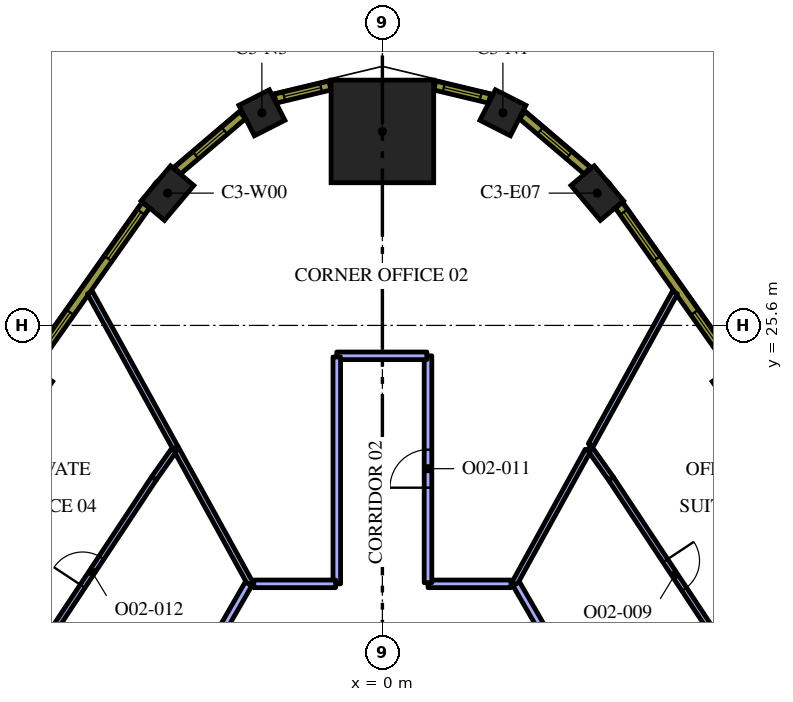
"""IFC4 building model, lengths in metres.
Left out: names, types, materials, properties, quantities, classifications, styles, units other than length and angle.
Written with IfcOpenShell. Run it as: python <this file> out.ifc"""

import sys

from ifc_helpers import new_model, si_unit, direction, frame, frame_2d, origin, origin_2d, place, context, subcontext, project, spatial, rectangle, extrude, element, fill, save


model = new_model("IFC4")
c1 = context("Model", 3, precision=1e-05, world=origin(), true_north=direction((0.0, 1.0)))
c2 = subcontext(c1, "Body", "Model", "MODEL_VIEW")
j1 = project(units=[si_unit("LENGTHUNIT", "METRE"), si_unit("PLANEANGLEUNIT", "RADIAN")], contexts=[c1])
p1 = place(None, origin())
s1 = spatial("IfcSite", under=j1, at=p1, CompositionType="ELEMENT")
p2 = place(p1, origin())
s2 = spatial("IfcBuilding", under=s1, at=p2, CompositionType="ELEMENT")
p3 = place(p2, frame((0.0, 0.0, 162.6)))
s3 = spatial("IfcBuildingStorey", under=s2, at=p3, CompositionType="ELEMENT", Elevation=162.6)
p4 = place(p3, frame((0.0, 30.704, 0.0), z_axis=(0.0, 0.0, 1.0), x_axis=(0.0, 1.0, 0.0)))
e1 = element("IfcColumn", 1, at=p4, inside=s3, PredefinedType="COLUMN", context=c2, shape_type="SweptSolid", body=[
    extrude(rectangle(XDim=2.7, YDim=2.7, at=origin_2d()), origin(), (0.0, 0.0, 1.0), 4.2),
])
for number, where, z_axis, x_axis in (
    (2, (9.348, 23.854, 0.0), (0.0, 0.0, 1.0), (-0.565, 0.825, 0.0)),
    (3, (5.654, 29.081, 0.0), (0.0, 0.0, 1.0), (-0.644, 0.765, 0.0)),
):
    element("IfcColumn", number, at=place(p3, frame(where, z_axis=z_axis, x_axis=x_axis)), inside=s3, PredefinedType="COLUMN", context=c2, shape_type="SweptSolid", body=[
        extrude(rectangle(XDim=1.2, YDim=0.8, at=origin_2d()), origin(), (0.0, 0.0, 1.0), 4.2),
    ])
for number, where, z_axis, x_axis in (
    (4, (3.171, 31.195, 0.0), (0.0, 0.0, 1.0), (-0.891, 0.453, 0.0)),
    (5, (-3.171, 31.195, 0.0), (0.0, 0.0, 1.0), (-0.891, -0.453, 0.0)),
):
    element("IfcColumn", number, at=place(p3, frame(where, z_axis=z_axis, x_axis=x_axis)), inside=s3, PredefinedType="COLUMN", context=c2, shape_type="SweptSolid", body=[
        extrude(rectangle(XDim=0.9, YDim=0.9, at=origin_2d()), origin(), (0.0, 0.0, 1.0), 4.2),
    ])
for number, where, z_axis, x_axis in (
    (6, (-5.654, 29.081, 0.0), (0.0, 0.0, 1.0), (-0.644, -0.765, 0.0)),
    (7, (-9.348, 23.854, 0.0), (0.0, 0.0, 1.0), (-0.565, -0.825, 0.0)),
):
    element("IfcColumn", number, at=place(p3, frame(where, z_axis=z_axis, x_axis=x_axis)), inside=s3, PredefinedType="COLUMN", context=c2, shape_type="SweptSolid", body=[
        extrude(rectangle(XDim=1.2, YDim=0.8, at=origin_2d()), origin(), (0.0, 0.0, 1.0), 4.2),
    ])
p5 = place(p3, frame((6.013, 21.573, 0.0), z_axis=(0.0, 0.0, 1.0), x_axis=(0.551906048292, -0.833906298009, 0.0)))
e8 = element("IfcWall", 8, at=p5, inside=s3, PredefinedType="PARTITIONING", context=c2, shape_type="SweptSolid", body=[
    extrude(rectangle(XDim=5.995, YDim=0.15, at=frame_2d((2.998, 0.0))), origin(), (0.0, 0.0, 1.0), 3.15),
])
p6 = place(p5, frame((2.595, 0.0, 0.0)))
e9 = element("IfcOpeningElement", 9, at=p6, cuts=e8, PredefinedType="OPENING", context=c2, shape_type="SweptSolid", body=[
    extrude(rectangle(XDim=0.9, YDim=2.1, at=frame_2d((0.45, 1.05))), frame((0.0, 0.085, 0.0), z_axis=(0.0, -1.0, 0.0), x_axis=(1.0, 0.0, 0.0)), (0.0, 0.0, 1.0), 0.17),
])
p7 = place(p3, frame((6.013, 21.573, 0.0), z_axis=(0.0, 0.0, 1.0), x_axis=(-0.576965221715, 0.816768714467, 0.0)))
e10 = element("IfcWall", 10, at=p7, inside=s3, PredefinedType="PARTITIONING", context=c2, shape_type="SweptSolid", body=[
    extrude(rectangle(XDim=0.986, YDim=0.15, at=frame_2d((0.493, 0.0))), origin(), (0.0, 0.0, 1.0), 3.15),
])
p8 = place(p3, frame((5.484, 22.451, 0.0), z_axis=(0.0, 0.0, 1.0), x_axis=(0.483018213307, 0.875610304652, 0.0)))
e11 = element("IfcWall", 11, at=p8, inside=s3, PredefinedType="PARTITIONING", context=c2, shape_type="SweptSolid", body=[
    extrude(rectangle(XDim=4.584, YDim=0.15, at=frame_2d((2.292, 0.0))), origin(), (0.0, 0.0, 1.0), 3.15),
])
p9 = place(p3, frame((3.47, 18.8, 0.0), z_axis=(0.0, 0.0, 1.0), x_axis=(0.483004783308, 0.87561771299, 0.0)))
e12 = element("IfcWall", 12, at=p9, inside=s3, PredefinedType="PARTITIONING", context=c2, shape_type="SweptSolid", body=[
    extrude(rectangle(XDim=4.003, YDim=0.15, at=frame_2d((2.001, 0.0))), origin(), (0.0, 0.0, 1.0), 3.15),
])
p10 = place(p3, frame((8.515, 10.152, 0.0), z_axis=(0.0, 0.0, 1.0), x_axis=(-0.499998974385, 0.866025995923, 0.0)))
e13 = element("IfcWall", 13, at=p10, inside=s3, PredefinedType="PARTITIONING", context=c2, shape_type="SweptSolid", body=[
    extrude(rectangle(XDim=9.986, YDim=0.2, at=frame_2d((4.993, 0.0))), origin(), (0.0, 0.0, 1.0), 3.15),
])
p11 = place(p10, frame((4.5, 0.0, 0.0)))
e14 = element("IfcOpeningElement", 14, at=p11, cuts=e13, PredefinedType="OPENING", context=c2, shape_type="SweptSolid", body=[
    extrude(rectangle(XDim=1.0, YDim=2.1, at=frame_2d((0.5, 1.05))), frame((0.0, 0.11, 0.0), z_axis=(0.0, -1.0, 0.0), x_axis=(1.0, 0.0, 0.0)), (0.0, 0.0, 1.0), 0.22),
])
p12 = place(p3, frame((-5.442, 22.374, 0.0), z_axis=(0.0, 0.0, 1.0), x_axis=(-0.482987550425, 0.875627218703, 0.0)))
e15 = element("IfcWall", 15, at=p12, inside=s3, PredefinedType="PARTITIONING", context=c2, shape_type="SweptSolid", body=[
    extrude(rectangle(XDim=4.672, YDim=0.15, at=frame_2d((2.336, 0.0))), origin(), (0.0, 0.0, 1.0), 3.15),
])
p13 = place(p3, frame((-3.47, 18.8, 0.0), z_axis=(0.0, 0.0, 1.0), x_axis=(-0.482974768035, 0.875634269225, 0.0)))
e16 = element("IfcWall", 16, at=p13, inside=s3, PredefinedType="PARTITIONING", context=c2, shape_type="SweptSolid", body=[
    extrude(rectangle(XDim=4.09, YDim=0.15, at=frame_2d((2.045, 0.0))), origin(), (0.0, 0.0, 1.0), 3.15),
])
p14 = place(p3, frame((3.385, 18.8, 0.0), z_axis=(0.0, 0.0, 1.0), x_axis=(-1.0, 0.0, 0.0)))
e17 = element("IfcWall", 17, at=p14, inside=s3, PredefinedType="PARTITIONING", context=c2, shape_type="SweptSolid", body=[
    extrude(rectangle(XDim=2.185, YDim=0.2, at=frame_2d((1.092, 0.0))), origin(), (0.0, 0.0, 1.0), 3.15),
])
p15 = place(p3, frame((1.2, 18.83, 0.0), z_axis=(0.0, 0.0, 1.0), x_axis=(0.0, 1.0, 0.0)))
e18 = element("IfcWall", 18, at=p15, inside=s3, PredefinedType="PARTITIONING", context=c2, shape_type="SweptSolid", body=[
    extrude(rectangle(XDim=5.97, YDim=0.2, at=frame_2d((2.985, 0.0))), origin(), (0.0, 0.0, 1.0), 3.15),
])
p16 = place(p15, frame((2.5, 0.0, 0.0)))
e19 = element("IfcOpeningElement", 19, at=p16, cuts=e18, PredefinedType="OPENING", context=c2, shape_type="SweptSolid", body=[
    extrude(rectangle(XDim=1.0, YDim=2.1, at=frame_2d((0.5, 1.05))), frame((0.0, 0.11, 0.0), z_axis=(0.0, -1.0, 0.0), x_axis=(1.0, 0.0, 0.0)), (0.0, 0.0, 1.0), 0.22),
])
p17 = place(p3, frame((1.17, 24.8, 0.0), z_axis=(0.0, 0.0, 1.0), x_axis=(-1.0, 0.0, 0.0)))
e20 = element("IfcWall", 20, at=p17, inside=s3, PredefinedType="PARTITIONING", context=c2, shape_type="SweptSolid", body=[
    extrude(rectangle(XDim=2.37, YDim=0.2, at=frame_2d((1.185, 0.0))), origin(), (0.0, 0.0, 1.0), 3.15),
])
p18 = place(p3, frame((-1.2, 24.77, 0.0), z_axis=(0.0, 0.0, 1.0), x_axis=(0.0, -1.0, 0.0)))
e21 = element("IfcWall", 21, at=p18, inside=s3, PredefinedType="PARTITIONING", context=c2, shape_type="SweptSolid", body=[
    extrude(rectangle(XDim=5.97, YDim=0.2, at=frame_2d((2.985, 0.0))), origin(), (0.0, 0.0, 1.0), 3.15),
])
p19 = place(p3, frame((-1.23, 18.8, 0.0), z_axis=(0.0, 0.0, 1.0), x_axis=(-1.0, 0.0, 0.0)))
e22 = element("IfcWall", 22, at=p19, inside=s3, PredefinedType="PARTITIONING", context=c2, shape_type="SweptSolid", body=[
    extrude(rectangle(XDim=2.155, YDim=0.2, at=frame_2d((1.077, 0.0))), origin(), (0.0, 0.0, 1.0), 3.15),
])
p20 = place(p3, frame((-5.492, 22.31, 0.0), z_axis=(0.0, 0.0, 1.0), x_axis=(-0.576980663571, -0.816757806124, 0.0)))
e23 = element("IfcWall", 23, at=p20, inside=s3, PredefinedType="PARTITIONING", context=c2, shape_type="SweptSolid", body=[
    extrude(rectangle(XDim=0.902, YDim=0.15, at=frame_2d((0.451, 0.0))), origin(), (0.0, 0.0, 1.0), 3.15),
])
p21 = place(p3, frame((-9.322, 16.573, 0.0), z_axis=(0.0, 0.0, 1.0), x_axis=(0.551906048292, 0.833906298009, 0.0)))
e24 = element("IfcWall", 24, at=p21, inside=s3, PredefinedType="PARTITIONING", context=c2, shape_type="SweptSolid", body=[
    extrude(rectangle(XDim=5.995, YDim=0.15, at=frame_2d((2.998, 0.0))), origin(), (0.0, 0.0, 1.0), 3.15),
])
p22 = place(p21, frame((2.595, 0.0, 0.0)))
e25 = element("IfcOpeningElement", 25, at=p22, cuts=e24, PredefinedType="OPENING", context=c2, shape_type="SweptSolid", body=[
    extrude(rectangle(XDim=0.9, YDim=2.1, at=frame_2d((0.45, 1.05))), frame((0.0, 0.085, 0.0), z_axis=(0.0, -1.0, 0.0), x_axis=(1.0, 0.0, 0.0)), (0.0, 0.0, 1.0), 0.17),
])
p23 = place(p3, frame((-3.522, 18.8, 0.0), z_axis=(0.0, 0.0, 1.0), x_axis=(-0.500015783377, -0.866016291056, 0.0)))
e26 = element("IfcWall", 26, at=p23, inside=s3, PredefinedType="PARTITIONING", context=c2, shape_type="SweptSolid", body=[
    extrude(rectangle(XDim=9.99, YDim=0.2, at=frame_2d((4.995, 0.0))), origin(), (0.0, 0.0, 1.0), 3.15),
])
p24 = place(p23, frame((4.5, 0.0, 0.0)))
e27 = element("IfcOpeningElement", 27, at=p24, cuts=e26, PredefinedType="OPENING", context=c2, shape_type="SweptSolid", body=[
    extrude(rectangle(XDim=1.0, YDim=2.1, at=frame_2d((0.5, 1.05))), frame((0.0, 0.11, 0.0), z_axis=(0.0, -1.0, 0.0), x_axis=(1.0, 0.0, 0.0)), (0.0, 0.0, 1.0), 0.22),
])
p25 = place(p3, frame((9.231, 24.504, 0.0), z_axis=(0.0, 0.0, 1.0), x_axis=(-0.577115207679, 0.816662743772, 0.0)))
e28 = element("IfcWall", 28, at=p25, inside=s3, PredefinedType="SOLIDWALL", context=c2, shape_type="SweptSolid", body=[
    extrude(rectangle(XDim=5.213, YDim=0.24, at=frame_2d((2.606, 0.0))), origin(), (0.0, 0.0, 1.0), 3.95),
])
p26 = place(p25, frame((0.261, 0.0, 0.9)))
e29 = element("IfcOpeningElement", 29, at=p26, cuts=e28, PredefinedType="OPENING", context=c2, shape_type="SweptSolid", body=[
    extrude(rectangle(XDim=1.5, YDim=2.55, at=frame_2d((0.75, 1.275))), frame((0.0, 0.13, 0.0), z_axis=(0.0, -1.0, 0.0), x_axis=(1.0, 0.0, 0.0)), (0.0, 0.0, 1.0), 0.26),
])
p27 = place(p25, frame((3.492, 0.0, 0.9)))
e30 = element("IfcOpeningElement", 30, at=p27, cuts=e28, PredefinedType="OPENING", context=c2, shape_type="SweptSolid", body=[
    extrude(rectangle(XDim=1.5, YDim=2.55, at=frame_2d((0.75, 1.275))), frame((0.0, 0.13, 0.0), z_axis=(0.0, -1.0, 0.0), x_axis=(1.0, 0.0, 0.0)), (0.0, 0.0, 1.0), 0.26),
])
p28 = place(p3, frame((5.392, 29.672, 0.0), z_axis=(0.0, 0.0, 1.0), x_axis=(-0.761419744247, 0.648259186645, 0.0)))
e31 = element("IfcWall", 31, at=p28, inside=s3, PredefinedType="SOLIDWALL", context=c2, shape_type="SweptSolid", body=[
    extrude(rectangle(XDim=2.25, YDim=0.24, at=frame_2d((1.125, 0.0))), origin(), (0.0, 0.0, 1.0), 3.95),
])
p29 = place(p28, frame((0.625, 0.0, 0.9)))
e32 = element("IfcOpeningElement", 32, at=p29, cuts=e31, PredefinedType="OPENING", context=c2, shape_type="SweptSolid", body=[
    extrude(rectangle(XDim=1.0, YDim=2.55, at=frame_2d((0.5, 1.275))), frame((0.0, 0.13, 0.0), z_axis=(0.0, -1.0, 0.0), x_axis=(1.0, 0.0, 0.0)), (0.0, 0.0, 1.0), 0.26),
])
p30 = place(p3, frame((2.821, 31.566, 0.0), z_axis=(0.0, 0.0, 1.0), x_axis=(-0.972479955788, 0.232986556673, 0.0)))
e33 = element("IfcWall", 33, at=p30, inside=s3, PredefinedType="SOLIDWALL", context=c2, shape_type="SweptSolid", body=[
    extrude(rectangle(XDim=1.482, YDim=0.24, at=frame_2d((0.741, 0.0))), origin(), (0.0, 0.0, 1.0), 3.95),
])
p31 = place(p30, frame((0.241, 0.0, 0.9)))
e34 = element("IfcOpeningElement", 34, at=p31, cuts=e33, PredefinedType="OPENING", context=c2, shape_type="SweptSolid", body=[
    extrude(rectangle(XDim=1.0, YDim=2.55, at=frame_2d((0.5, 1.275))), frame((0.0, 0.13, 0.0), z_axis=(0.0, -1.0, 0.0), x_axis=(1.0, 0.0, 0.0)), (0.0, 0.0, 1.0), 0.26),
])
p32 = place(p3, frame((-1.38, 31.912, 0.0), z_axis=(0.0, 0.0, 1.0), x_axis=(-0.972479955788, -0.232986556673, 0.0)))
e35 = element("IfcWall", 35, at=p32, inside=s3, PredefinedType="SOLIDWALL", context=c2, shape_type="SweptSolid", body=[
    extrude(rectangle(XDim=1.482, YDim=0.24, at=frame_2d((0.741, 0.0))), origin(), (0.0, 0.0, 1.0), 3.95),
])
p33 = place(p32, frame((0.241, 0.0, 0.9)))
e36 = element("IfcOpeningElement", 36, at=p33, cuts=e35, PredefinedType="OPENING", context=c2, shape_type="SweptSolid", body=[
    extrude(rectangle(XDim=1.0, YDim=2.55, at=frame_2d((0.5, 1.275))), frame((0.0, 0.13, 0.0), z_axis=(0.0, -1.0, 0.0), x_axis=(1.0, 0.0, 0.0)), (0.0, 0.0, 1.0), 0.26),
])
p34 = place(p3, frame((-3.678, 31.131, 0.0), z_axis=(0.0, 0.0, 1.0), x_axis=(-0.761419744247, -0.648259186645, 0.0)))
e37 = element("IfcWall", 37, at=p34, inside=s3, PredefinedType="SOLIDWALL", context=c2, shape_type="SweptSolid", body=[
    extrude(rectangle(XDim=2.25, YDim=0.24, at=frame_2d((1.125, 0.0))), origin(), (0.0, 0.0, 1.0), 3.95),
])
p35 = place(p34, frame((0.625, 0.0, 0.9)))
e38 = element("IfcOpeningElement", 38, at=p35, cuts=e37, PredefinedType="OPENING", context=c2, shape_type="SweptSolid", body=[
    extrude(rectangle(XDim=1.0, YDim=2.55, at=frame_2d((0.5, 1.275))), frame((0.0, 0.13, 0.0), z_axis=(0.0, -1.0, 0.0), x_axis=(1.0, 0.0, 0.0)), (0.0, 0.0, 1.0), 0.26),
])
p36 = place(p3, frame((-6.223, 28.762, 0.0), z_axis=(0.0, 0.0, 1.0), x_axis=(-0.577115207679, -0.816662743772, 0.0)))
e39 = element("IfcWall", 39, at=p36, inside=s3, PredefinedType="SOLIDWALL", context=c2, shape_type="SweptSolid", body=[
    extrude(rectangle(XDim=5.213, YDim=0.24, at=frame_2d((2.606, 0.0))), origin(), (0.0, 0.0, 1.0), 3.95),
])
p37 = place(p36, frame((0.221, 0.0, 0.9)))
e40 = element("IfcOpeningElement", 40, at=p37, cuts=e39, PredefinedType="OPENING", context=c2, shape_type="SweptSolid", body=[
    extrude(rectangle(XDim=1.5, YDim=2.55, at=frame_2d((0.75, 1.275))), frame((0.0, 0.13, 0.0), z_axis=(0.0, -1.0, 0.0), x_axis=(1.0, 0.0, 0.0)), (0.0, 0.0, 1.0), 0.26),
])
p38 = place(p36, frame((3.452, 0.0, 0.9)))
e41 = element("IfcOpeningElement", 41, at=p38, cuts=e39, PredefinedType="OPENING", context=c2, shape_type="SweptSolid", body=[
    extrude(rectangle(XDim=1.5, YDim=2.55, at=frame_2d((0.75, 1.275))), frame((0.0, 0.13, 0.0), z_axis=(0.0, -1.0, 0.0), x_axis=(1.0, 0.0, 0.0)), (0.0, 0.0, 1.0), 0.26),
])
p39 = place(p6, origin())
e42 = element("IfcDoor", 42, at=p39, inside=s3, OperationType="SINGLE_SWING_RIGHT", PredefinedType="DOOR", context=c2, shape_type="SweptSolid", body=[
    extrude(rectangle(XDim=0.9, YDim=2.1, at=frame_2d((0.45, 1.05))), frame((0.0, 0.025, 0.0), z_axis=(0.0, -1.0, 0.0), x_axis=(1.0, 0.0, 0.0)), (0.0, 0.0, 1.0), 0.05),
])
fill(e9, e42)
p40 = place(p16, origin())
e43 = element("IfcDoor", 43, at=p40, inside=s3, OperationType="SINGLE_SWING_RIGHT", PredefinedType="DOOR", context=c2, shape_type="SweptSolid", body=[
    extrude(rectangle(XDim=1.0, YDim=2.1, at=frame_2d((0.5, 1.05))), frame((0.0, 0.025, 0.0), z_axis=(0.0, -1.0, 0.0), x_axis=(1.0, 0.0, 0.0)), (0.0, 0.0, 1.0), 0.05),
])
fill(e19, e43)
p41 = place(p22, origin())
e44 = element("IfcDoor", 44, at=p41, inside=s3, OperationType="SINGLE_SWING_RIGHT", PredefinedType="DOOR", context=c2, shape_type="SweptSolid", body=[
    extrude(rectangle(XDim=0.9, YDim=2.1, at=frame_2d((0.45, 1.05))), frame((0.0, 0.025, 0.0), z_axis=(0.0, -1.0, 0.0), x_axis=(1.0, 0.0, 0.0)), (0.0, 0.0, 1.0), 0.05),
])
fill(e25, e44)
p42 = place(p26, origin())
e45 = element("IfcWindow", 45, at=p42, inside=s3, PartitioningType="SINGLE_PANEL", PredefinedType="WINDOW", context=c2, shape_type="SweptSolid", body=[
    extrude(rectangle(XDim=1.5, YDim=2.55, at=frame_2d((0.75, 1.275))), frame((0.0, 0.04, 0.0), z_axis=(0.0, -1.0, 0.0), x_axis=(1.0, 0.0, 0.0)), (0.0, 0.0, 1.0), 0.06),
])
fill(e29, e45)
p43 = place(p27, origin())
e46 = element("IfcWindow", 46, at=p43, inside=s3, PartitioningType="SINGLE_PANEL", PredefinedType="WINDOW", context=c2, shape_type="SweptSolid", body=[
    extrude(rectangle(XDim=1.5, YDim=2.55, at=frame_2d((0.75, 1.275))), frame((0.0, 0.04, 0.0), z_axis=(0.0, -1.0, 0.0), x_axis=(1.0, 0.0, 0.0)), (0.0, 0.0, 1.0), 0.06),
])
fill(e30, e46)
p44 = place(p29, origin())
e47 = element("IfcWindow", 47, at=p44, inside=s3, PartitioningType="SINGLE_PANEL", PredefinedType="WINDOW", context=c2, shape_type="SweptSolid", body=[
    extrude(rectangle(XDim=1.0, YDim=2.55, at=frame_2d((0.5, 1.275))), frame((0.0, 0.04, 0.0), z_axis=(0.0, -1.0, 0.0), x_axis=(1.0, 0.0, 0.0)), (0.0, 0.0, 1.0), 0.06),
])
fill(e32, e47)
p45 = place(p31, origin())
e48 = element("IfcWindow", 48, at=p45, inside=s3, PartitioningType="SINGLE_PANEL", PredefinedType="WINDOW", context=c2, shape_type="SweptSolid", body=[
    extrude(rectangle(XDim=1.0, YDim=2.55, at=frame_2d((0.5, 1.275))), frame((0.0, 0.04, 0.0), z_axis=(0.0, -1.0, 0.0), x_axis=(1.0, 0.0, 0.0)), (0.0, 0.0, 1.0), 0.06),
])
fill(e34, e48)
p46 = place(p33, origin())
e49 = element("IfcWindow", 49, at=p46, inside=s3, PartitioningType="SINGLE_PANEL", PredefinedType="WINDOW", context=c2, shape_type="SweptSolid", body=[
    extrude(rectangle(XDim=1.0, YDim=2.55, at=frame_2d((0.5, 1.275))), frame((0.0, 0.04, 0.0), z_axis=(0.0, -1.0, 0.0), x_axis=(1.0, 0.0, 0.0)), (0.0, 0.0, 1.0), 0.06),
])
fill(e36, e49)
p47 = place(p35, origin())
e50 = element("IfcWindow", 50, at=p47, inside=s3, PartitioningType="SINGLE_PANEL", PredefinedType="WINDOW", context=c2, shape_type="SweptSolid", body=[
    extrude(rectangle(XDim=1.0, YDim=2.55, at=frame_2d((0.5, 1.275))), frame((0.0, 0.04, 0.0), z_axis=(0.0, -1.0, 0.0), x_axis=(1.0, 0.0, 0.0)), (0.0, 0.0, 1.0), 0.06),
])
fill(e38, e50)
p48 = place(p37, origin())
e51 = element("IfcWindow", 51, at=p48, inside=s3, PartitioningType="SINGLE_PANEL", PredefinedType="WINDOW", context=c2, shape_type="SweptSolid", body=[
    extrude(rectangle(XDim=1.5, YDim=2.55, at=frame_2d((0.75, 1.275))), frame((0.0, 0.04, 0.0), z_axis=(0.0, -1.0, 0.0), x_axis=(1.0, 0.0, 0.0)), (0.0, 0.0, 1.0), 0.06),
])
fill(e40, e51)
p49 = place(p38, origin())
e52 = element("IfcWindow", 52, at=p49, inside=s3, PartitioningType="SINGLE_PANEL", PredefinedType="WINDOW", context=c2, shape_type="SweptSolid", body=[
    extrude(rectangle(XDim=1.5, YDim=2.55, at=frame_2d((0.75, 1.275))), frame((0.0, 0.04, 0.0), z_axis=(0.0, -1.0, 0.0), x_axis=(1.0, 0.0, 0.0)), (0.0, 0.0, 1.0), 0.06),
])
fill(e41, e52)
save(model, sys.argv[1])
